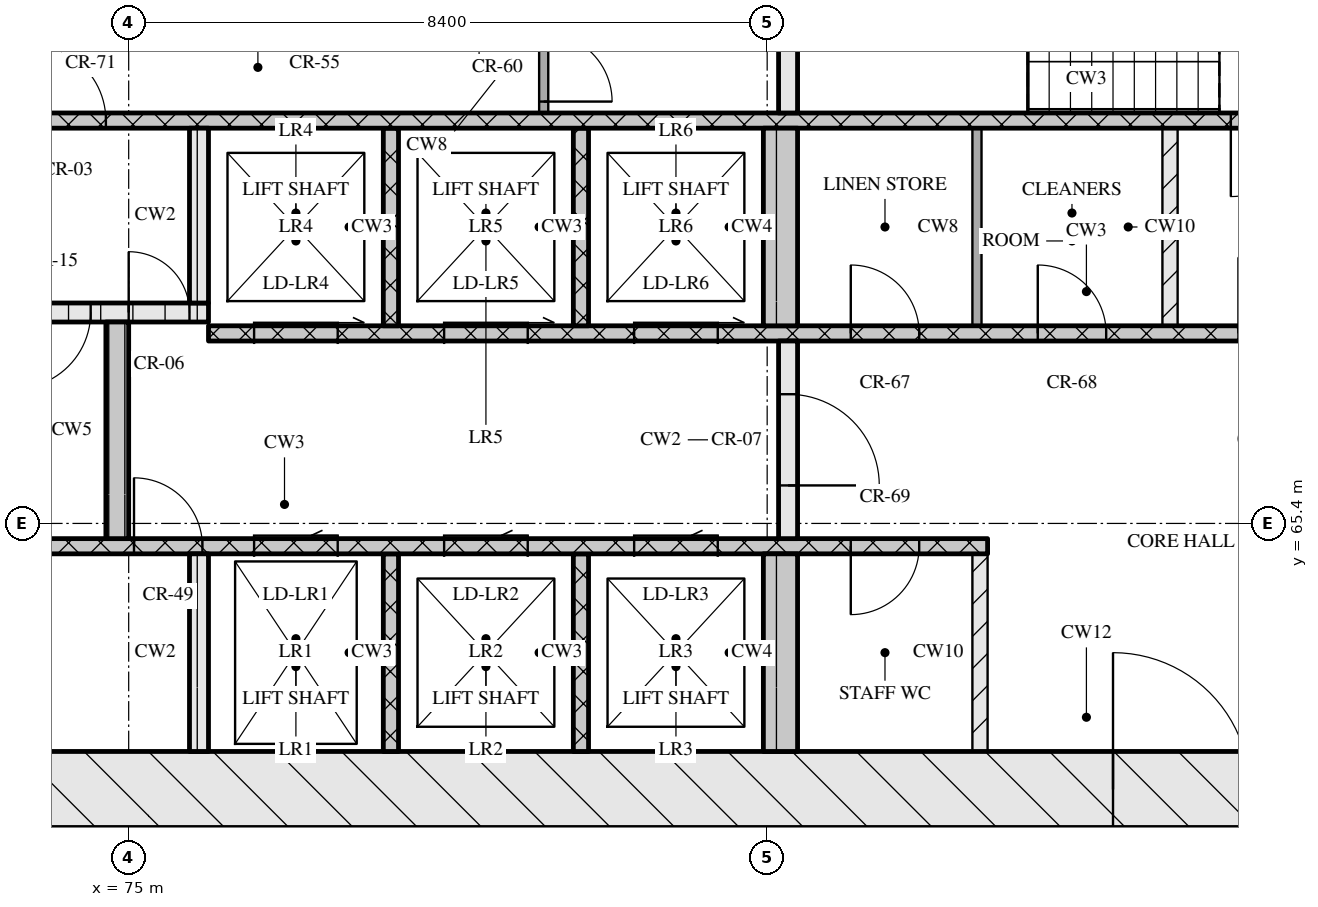
"""IFC4 building model, lengths in metres.
Left out: names, types, materials, properties, quantities, classifications, styles, units other than length and angle.
Written with IfcOpenShell. Run it as: python <this file> out.ifc"""

import sys

from ifc_helpers import new_model, si_unit, direction, frame, frame_2d, origin, place, context, subcontext, project, spatial, rectangle, extrude, element, fill, save


model = new_model("IFC4")
c1 = context("Model", 3, precision=1e-05, world=origin(), true_north=direction((0.0, 1.0)))
c2 = subcontext(c1, "Body", "Model", "MODEL_VIEW")
j1 = project(units=[si_unit("LENGTHUNIT", "METRE"), si_unit("PLANEANGLEUNIT", "RADIAN")], contexts=[c1])
p1 = place(None, origin())
s1 = spatial("IfcSite", under=j1, at=p1, CompositionType="ELEMENT")
p2 = place(p1, origin())
s2 = spatial("IfcBuilding", under=s1, at=p2, CompositionType="ELEMENT")
p3 = place(p2, frame((0.0, 0.0, 116.85)))
s3 = spatial("IfcBuildingStorey", under=s2, at=p3, CompositionType="ELEMENT", Elevation=116.85)
p4 = place(p3, frame((66.8, 61.9, 0.0), z_axis=(0.0, 0.0, 1.0), x_axis=(1.0, 0.0, 0.0)))
e1 = element("IfcWall", 1, at=p4, inside=s3, PredefinedType="SOLIDWALL", context=c2, shape_type="SweptSolid", body=[
    extrude(rectangle(XDim=41.6, YDim=1.0, at=frame_2d((20.8, 0.0))), origin(), (0.0, 0.0, 1.0), 3.32),
])
p5 = place(p4, frame((21.15, 0.0, 0.0)))
e2 = element("IfcOpeningElement", 2, at=p5, cuts=e1, PredefinedType="OPENING", context=c2, shape_type="SweptSolid", body=[
    extrude(rectangle(XDim=1.8, YDim=2.1, at=frame_2d((0.9, 1.05))), frame((0.0, 0.51, 0.0), z_axis=(0.0, -1.0, 0.0), x_axis=(1.0, 0.0, 0.0)), (0.0, 0.0, 1.0), 1.02),
])
p6 = place(p3, frame((75.925, 62.4, 0.0), z_axis=(0.0, 0.0, 1.0), x_axis=(0.0, 1.0, 0.0)))
e3 = element("IfcWall", 3, at=p6, inside=s3, PredefinedType="SOLIDWALL", context=c2, shape_type="SweptSolid", body=[
    extrude(rectangle(XDim=2.6, YDim=0.25, at=frame_2d((1.3, 0.0))), origin(), (0.0, 0.0, 1.0), 3.32),
])
for number, where, z_axis, x_axis in (
    (4, (78.45, 62.4, 0.0), (0.0, 0.0, 1.0), (0.0, 1.0, 0.0)),
    (5, (80.95, 62.4, 0.0), (0.0, 0.0, 1.0), (0.0, 1.0, 0.0)),
):
    element("IfcWall", number, at=place(p3, frame(where, z_axis=z_axis, x_axis=x_axis)), inside=s3, PredefinedType="SOLIDWALL", context=c2, shape_type="SweptSolid", body=[
        extrude(rectangle(XDim=2.6, YDim=0.2, at=frame_2d((1.3, 0.0))), origin(), (0.0, 0.0, 1.0), 3.32),
    ])
p7 = place(p3, frame((83.575, 62.4, 0.0), z_axis=(0.0, 0.0, 1.0), x_axis=(0.0, 1.0, 0.0)))
e6 = element("IfcWall", 6, at=p7, inside=s3, PredefinedType="SOLIDWALL", context=c2, shape_type="SweptSolid", body=[
    extrude(rectangle(XDim=2.6, YDim=0.45, at=frame_2d((1.3, 0.0))), origin(), (0.0, 0.0, 1.0), 3.32),
])
p8 = place(p3, frame((86.2, 62.4, 0.0), z_axis=(0.0, 0.0, 1.0), x_axis=(0.0, 1.0, 0.0)))
e7 = element("IfcWall", 7, at=p8, inside=s3, PredefinedType="PARTITIONING", context=c2, shape_type="SweptSolid", body=[
    extrude(rectangle(XDim=2.6, YDim=0.2, at=frame_2d((1.3, 0.0))), origin(), (0.0, 0.0, 1.0), 3.32),
])
p9 = place(p3, frame((67.8, 65.1, 0.0), z_axis=(0.0, 0.0, 1.0), x_axis=(1.0, 0.0, 0.0)))
e8 = element("IfcWall", 8, at=p9, inside=s3, PredefinedType="SOLIDWALL", context=c2, shape_type="SweptSolid", body=[
    extrude(rectangle(XDim=18.5, YDim=0.2, at=frame_2d((9.25, 0.0))), origin(), (0.0, 0.0, 1.0), 3.32),
])
p10 = place(p9, frame((7.27, 0.0, 0.0)))
e9 = element("IfcOpeningElement", 9, at=p10, cuts=e8, PredefinedType="OPENING", context=c2, shape_type="SweptSolid", body=[
    extrude(rectangle(XDim=0.9, YDim=2.1, at=frame_2d((0.45, 1.05))), frame((0.0, 0.11, 0.0), z_axis=(0.0, -1.0, 0.0), x_axis=(1.0, 0.0, 0.0)), (0.0, 0.0, 1.0), 0.22),
])
p11 = place(p9, frame((8.85, 0.0, 0.0)))
e10 = element("IfcOpeningElement", 10, at=p11, cuts=e8, PredefinedType="OPENING", context=c2, shape_type="SweptSolid", body=[
    extrude(rectangle(XDim=1.1, YDim=2.1, at=frame_2d((0.55, 1.05))), frame((0.0, 0.11, 0.0), z_axis=(0.0, -1.0, 0.0), x_axis=(1.0, 0.0, 0.0)), (0.0, 0.0, 1.0), 0.22),
])
p12 = place(p9, frame((11.35, 0.0, 0.0)))
e11 = element("IfcOpeningElement", 11, at=p12, cuts=e8, PredefinedType="OPENING", context=c2, shape_type="SweptSolid", body=[
    extrude(rectangle(XDim=1.1, YDim=2.1, at=frame_2d((0.55, 1.05))), frame((0.0, 0.11, 0.0), z_axis=(0.0, -1.0, 0.0), x_axis=(1.0, 0.0, 0.0)), (0.0, 0.0, 1.0), 0.22),
])
p13 = place(p9, frame((13.85, 0.0, 0.0)))
e12 = element("IfcOpeningElement", 12, at=p13, cuts=e8, PredefinedType="OPENING", context=c2, shape_type="SweptSolid", body=[
    extrude(rectangle(XDim=1.1, YDim=2.1, at=frame_2d((0.55, 1.05))), frame((0.0, 0.11, 0.0), z_axis=(0.0, -1.0, 0.0), x_axis=(1.0, 0.0, 0.0)), (0.0, 0.0, 1.0), 0.22),
])
p14 = place(p9, frame((16.7, 0.0, 0.0)))
e13 = element("IfcOpeningElement", 13, at=p14, cuts=e8, PredefinedType="OPENING", context=c2, shape_type="SweptSolid", body=[
    extrude(rectangle(XDim=0.9, YDim=2.1, at=frame_2d((0.45, 1.05))), frame((0.0, 0.11, 0.0), z_axis=(0.0, -1.0, 0.0), x_axis=(1.0, 0.0, 0.0)), (0.0, 0.0, 1.0), 0.22),
])
p15 = place(p3, frame((74.85, 65.2, 0.0), z_axis=(0.0, 0.0, 1.0), x_axis=(0.0, 1.0, 0.0)))
e14 = element("IfcWall", 14, at=p15, inside=s3, PredefinedType="SOLIDWALL", context=c2, shape_type="SweptSolid", body=[
    extrude(rectangle(XDim=2.85, YDim=0.3, at=frame_2d((1.425, 0.0))), origin(), (0.0, 0.0, 1.0), 3.32),
])
p16 = place(p3, frame((83.675, 65.2, 0.0), z_axis=(0.0, 0.0, 1.0), x_axis=(0.0, 1.0, 0.0)))
e15 = element("IfcWall", 15, at=p16, inside=s3, PredefinedType="SOLIDWALL", context=c2, shape_type="SweptSolid", body=[
    extrude(rectangle(XDim=2.6, YDim=0.25, at=frame_2d((1.3, 0.0))), origin(), (0.0, 0.0, 1.0), 3.32),
])
p17 = place(p16, frame((0.7, 0.0, 0.0)))
e16 = element("IfcOpeningElement", 16, at=p17, cuts=e15, PredefinedType="OPENING", context=c2, shape_type="SweptSolid", body=[
    extrude(rectangle(XDim=1.2, YDim=2.1, at=frame_2d((0.6, 1.05))), frame((0.0, 0.135, 0.0), z_axis=(0.0, -1.0, 0.0), x_axis=(1.0, 0.0, 0.0)), (0.0, 0.0, 1.0), 0.27),
])
p18 = place(p3, frame((76.05, 67.9, 0.0), z_axis=(0.0, 0.0, 1.0), x_axis=(1.0, 0.0, 0.0)))
e17 = element("IfcWall", 17, at=p18, inside=s3, PredefinedType="SOLIDWALL", context=c2, shape_type="SweptSolid", body=[
    extrude(rectangle(XDim=23.1, YDim=0.2, at=frame_2d((11.55, 0.0))), origin(), (0.0, 0.0, 1.0), 3.32),
])
p19 = place(p18, frame((0.6, 0.0, 0.0)))
e18 = element("IfcOpeningElement", 18, at=p19, cuts=e17, PredefinedType="OPENING", context=c2, shape_type="SweptSolid", body=[
    extrude(rectangle(XDim=1.1, YDim=2.1, at=frame_2d((0.55, 1.05))), frame((0.0, 0.11, 0.0), z_axis=(0.0, -1.0, 0.0), x_axis=(1.0, 0.0, 0.0)), (0.0, 0.0, 1.0), 0.22),
])
p20 = place(p18, frame((3.1, 0.0, 0.0)))
e19 = element("IfcOpeningElement", 19, at=p20, cuts=e17, PredefinedType="OPENING", context=c2, shape_type="SweptSolid", body=[
    extrude(rectangle(XDim=1.1, YDim=2.1, at=frame_2d((0.55, 1.05))), frame((0.0, 0.11, 0.0), z_axis=(0.0, -1.0, 0.0), x_axis=(1.0, 0.0, 0.0)), (0.0, 0.0, 1.0), 0.22),
])
p21 = place(p18, frame((5.6, 0.0, 0.0)))
e20 = element("IfcOpeningElement", 20, at=p21, cuts=e17, PredefinedType="OPENING", context=c2, shape_type="SweptSolid", body=[
    extrude(rectangle(XDim=1.1, YDim=2.1, at=frame_2d((0.55, 1.05))), frame((0.0, 0.11, 0.0), z_axis=(0.0, -1.0, 0.0), x_axis=(1.0, 0.0, 0.0)), (0.0, 0.0, 1.0), 0.22),
])
p22 = place(p18, frame((8.45, 0.0, 0.0)))
e21 = element("IfcOpeningElement", 21, at=p22, cuts=e17, PredefinedType="OPENING", context=c2, shape_type="SweptSolid", body=[
    extrude(rectangle(XDim=0.9, YDim=2.1, at=frame_2d((0.45, 1.05))), frame((0.0, 0.11, 0.0), z_axis=(0.0, -1.0, 0.0), x_axis=(1.0, 0.0, 0.0)), (0.0, 0.0, 1.0), 0.22),
])
p23 = place(p18, frame((10.91, 0.0, 0.0)))
e22 = element("IfcOpeningElement", 22, at=p23, cuts=e17, PredefinedType="OPENING", context=c2, shape_type="SweptSolid", body=[
    extrude(rectangle(XDim=0.9, YDim=2.1, at=frame_2d((0.45, 1.05))), frame((0.0, 0.11, 0.0), z_axis=(0.0, -1.0, 0.0), x_axis=(1.0, 0.0, 0.0)), (0.0, 0.0, 1.0), 0.22),
])
p24 = place(p18, frame((13.55, 0.0, 0.0)))
e23 = element("IfcOpeningElement", 23, at=p24, cuts=e17, PredefinedType="OPENING", context=c2, shape_type="SweptSolid", body=[
    extrude(rectangle(XDim=1.0, YDim=2.1, at=frame_2d((0.5, 1.05))), frame((0.0, 0.11, 0.0), z_axis=(0.0, -1.0, 0.0), x_axis=(1.0, 0.0, 0.0)), (0.0, 0.0, 1.0), 0.22),
])
for number, where, z_axis, x_axis in (
    (24, (78.45, 68.0, 0.0), (0.0, 0.0, 1.0), (0.0, 1.0, 0.0)),
    (25, (80.95, 68.0, 0.0), (0.0, 0.0, 1.0), (0.0, 1.0, 0.0)),
):
    element("IfcWall", number, at=place(p3, frame(where, z_axis=z_axis, x_axis=x_axis)), inside=s3, PredefinedType="SOLIDWALL", context=c2, shape_type="SweptSolid", body=[
        extrude(rectangle(XDim=2.6, YDim=0.2, at=frame_2d((1.3, 0.0))), origin(), (0.0, 0.0, 1.0), 3.32),
    ])
p25 = place(p3, frame((83.575, 68.0, 0.0), z_axis=(0.0, 0.0, 1.0), x_axis=(0.0, 1.0, 0.0)))
e26 = element("IfcWall", 26, at=p25, inside=s3, PredefinedType="SOLIDWALL", context=c2, shape_type="SweptSolid", body=[
    extrude(rectangle(XDim=2.6, YDim=0.45, at=frame_2d((1.3, 0.0))), origin(), (0.0, 0.0, 1.0), 3.32),
])
p26 = place(p3, frame((86.16, 68.0, 0.0), z_axis=(0.0, 0.0, 1.0), x_axis=(0.0, 1.0, 0.0)))
e27 = element("IfcWall", 27, at=p26, inside=s3, PredefinedType="PARTITIONING", context=c2, shape_type="SweptSolid", body=[
    extrude(rectangle(XDim=2.6, YDim=0.12, at=frame_2d((1.3, 0.0))), origin(), (0.0, 0.0, 1.0), 3.32),
])
p27 = place(p3, frame((88.7, 68.0, 0.0), z_axis=(0.0, 0.0, 1.0), x_axis=(0.0, 1.0, 0.0)))
e28 = element("IfcWall", 28, at=p27, inside=s3, PredefinedType="PARTITIONING", context=c2, shape_type="SweptSolid", body=[
    extrude(rectangle(XDim=2.6, YDim=0.2, at=frame_2d((1.3, 0.0))), origin(), (0.0, 0.0, 1.0), 3.32),
])
p28 = place(p3, frame((67.8, 68.175, 0.0), z_axis=(0.0, 0.0, 1.0), x_axis=(1.0, 0.0, 0.0)))
e29 = element("IfcWall", 29, at=p28, inside=s3, PredefinedType="SOLIDWALL", context=c2, shape_type="SweptSolid", body=[
    extrude(rectangle(XDim=8.25, YDim=0.25, at=frame_2d((4.125, 0.0))), origin(), (0.0, 0.0, 1.0), 3.32),
])
p29 = place(p28, frame((5.7, 0.0, 0.0)))
e30 = element("IfcOpeningElement", 30, at=p29, cuts=e29, PredefinedType="OPENING", context=c2, shape_type="SweptSolid", body=[
    extrude(rectangle(XDim=1.0, YDim=2.1, at=frame_2d((0.5, 1.05))), frame((0.0, 0.135, 0.0), z_axis=(0.0, -1.0, 0.0), x_axis=(1.0, 0.0, 0.0)), (0.0, 0.0, 1.0), 0.27),
])
p30 = place(p28, frame((7.2, 0.0, 0.0)))
e31 = element("IfcOpeningElement", 31, at=p30, cuts=e29, PredefinedType="OPENING", context=c2, shape_type="SweptSolid", body=[
    extrude(rectangle(XDim=0.8, YDim=2.1, at=frame_2d((0.4, 1.05))), frame((0.0, 0.135, 0.0), z_axis=(0.0, -1.0, 0.0), x_axis=(1.0, 0.0, 0.0)), (0.0, 0.0, 1.0), 0.27),
])
p31 = place(p3, frame((75.925, 68.3, 0.0), z_axis=(0.0, 0.0, 1.0), x_axis=(0.0, 1.0, 0.0)))
e32 = element("IfcWall", 32, at=p31, inside=s3, PredefinedType="SOLIDWALL", context=c2, shape_type="SweptSolid", body=[
    extrude(rectangle(XDim=2.3, YDim=0.25, at=frame_2d((1.15, 0.0))), origin(), (0.0, 0.0, 1.0), 3.32),
])
p32 = place(p3, frame((67.8, 70.7, 0.0), z_axis=(0.0, 0.0, 1.0), x_axis=(1.0, 0.0, 0.0)))
e33 = element("IfcWall", 33, at=p32, inside=s3, PredefinedType="SOLIDWALL", context=c2, shape_type="SweptSolid", body=[
    extrude(rectangle(XDim=39.6, YDim=0.2, at=frame_2d((19.8, 0.0))), origin(), (0.0, 0.0, 1.0), 3.32),
])
p33 = place(p32, frame((0.65, 0.0, 0.0)))
e34 = element("IfcOpeningElement", 34, at=p33, cuts=e33, PredefinedType="OPENING", context=c2, shape_type="SweptSolid", body=[
    extrude(rectangle(XDim=1.1, YDim=2.1, at=frame_2d((0.55, 1.05))), frame((0.0, 0.11, 0.0), z_axis=(0.0, -1.0, 0.0), x_axis=(1.0, 0.0, 0.0)), (0.0, 0.0, 1.0), 0.22),
])
p34 = place(p32, frame((3.25, 0.0, 0.0)))
e35 = element("IfcOpeningElement", 35, at=p34, cuts=e33, PredefinedType="OPENING", context=c2, shape_type="SweptSolid", body=[
    extrude(rectangle(XDim=1.1, YDim=2.1, at=frame_2d((0.55, 1.05))), frame((0.0, 0.11, 0.0), z_axis=(0.0, -1.0, 0.0), x_axis=(1.0, 0.0, 0.0)), (0.0, 0.0, 1.0), 0.22),
])
p35 = place(p32, frame((5.9, 0.0, 0.0)))
e36 = element("IfcOpeningElement", 36, at=p35, cuts=e33, PredefinedType="OPENING", context=c2, shape_type="SweptSolid", body=[
    extrude(rectangle(XDim=1.0, YDim=2.1, at=frame_2d((0.5, 1.05))), frame((0.0, 0.11, 0.0), z_axis=(0.0, -1.0, 0.0), x_axis=(1.0, 0.0, 0.0)), (0.0, 0.0, 1.0), 0.22),
])
p36 = place(p32, frame((21.7, 0.0, 0.0)))
e37 = element("IfcOpeningElement", 37, at=p36, cuts=e33, PredefinedType="OPENING", context=c2, shape_type="SweptSolid", body=[
    extrude(rectangle(XDim=1.0, YDim=2.1, at=frame_2d((0.5, 1.05))), frame((0.0, 0.11, 0.0), z_axis=(0.0, -1.0, 0.0), x_axis=(1.0, 0.0, 0.0)), (0.0, 0.0, 1.0), 0.22),
])
p37 = place(p32, frame((32.7, 0.0, 0.0)))
e38 = element("IfcOpeningElement", 38, at=p37, cuts=e33, PredefinedType="OPENING", context=c2, shape_type="SweptSolid", body=[
    extrude(rectangle(XDim=1.0, YDim=2.1, at=frame_2d((0.5, 1.05))), frame((0.0, 0.11, 0.0), z_axis=(0.0, -1.0, 0.0), x_axis=(1.0, 0.0, 0.0)), (0.0, 0.0, 1.0), 0.22),
])
p38 = place(p32, frame((35.25, 0.0, 0.0)))
e39 = element("IfcOpeningElement", 39, at=p38, cuts=e33, PredefinedType="OPENING", context=c2, shape_type="SweptSolid", body=[
    extrude(rectangle(XDim=1.1, YDim=2.1, at=frame_2d((0.55, 1.05))), frame((0.0, 0.11, 0.0), z_axis=(0.0, -1.0, 0.0), x_axis=(1.0, 0.0, 0.0)), (0.0, 0.0, 1.0), 0.22),
])
p39 = place(p32, frame((37.85, 0.0, 0.0)))
e40 = element("IfcOpeningElement", 40, at=p39, cuts=e33, PredefinedType="OPENING", context=c2, shape_type="SweptSolid", body=[
    extrude(rectangle(XDim=1.1, YDim=2.1, at=frame_2d((0.55, 1.05))), frame((0.0, 0.11, 0.0), z_axis=(0.0, -1.0, 0.0), x_axis=(1.0, 0.0, 0.0)), (0.0, 0.0, 1.0), 0.22),
])
p40 = place(p3, frame((80.46, 70.8, 0.0), z_axis=(0.0, 0.0, 1.0), x_axis=(0.0, 1.0, 0.0)))
e41 = element("IfcWall", 41, at=p40, inside=s3, PredefinedType="PARTITIONING", context=c2, shape_type="SweptSolid", body=[
    extrude(rectangle(XDim=1.2, YDim=0.12, at=frame_2d((0.6, 0.0))), origin(), (0.0, 0.0, 1.0), 3.32),
])
p41 = place(p40, frame((0.15, 0.0, 0.0)))
e42 = element("IfcOpeningElement", 42, at=p41, cuts=e41, PredefinedType="OPENING", context=c2, shape_type="SweptSolid", body=[
    extrude(rectangle(XDim=0.9, YDim=2.1, at=frame_2d((0.45, 1.05))), frame((0.0, 0.07, 0.0), z_axis=(0.0, -1.0, 0.0), x_axis=(1.0, 0.0, 0.0)), (0.0, 0.0, 1.0), 0.14),
])
p42 = place(p3, frame((83.675, 70.8, 0.0), z_axis=(0.0, 0.0, 1.0), x_axis=(0.0, 1.0, 0.0)))
e43 = element("IfcWall", 43, at=p42, inside=s3, PredefinedType="SOLIDWALL", context=c2, shape_type="SweptSolid", body=[
    extrude(rectangle(XDim=2.95, YDim=0.25, at=frame_2d((1.475, 0.0))), origin(), (0.0, 0.0, 1.0), 3.32),
])
p43 = place(p5, origin())
e44 = element("IfcDoor", 44, at=p43, inside=s3, OperationType="DOUBLE_DOOR_SINGLE_SWING", PredefinedType="DOOR", context=c2, shape_type="SweptSolid", body=[
    extrude(rectangle(XDim=1.8, YDim=2.1, at=frame_2d((0.9, 1.05))), frame((0.0, 0.025, 0.0), z_axis=(0.0, -1.0, 0.0), x_axis=(1.0, 0.0, 0.0)), (0.0, 0.0, 1.0), 0.05),
])
fill(e2, e44)
p44 = place(p10, origin())
e45 = element("IfcDoor", 45, at=p44, inside=s3, OperationType="SINGLE_SWING_LEFT", PredefinedType="DOOR", context=c2, shape_type="SweptSolid", body=[
    extrude(rectangle(XDim=0.9, YDim=2.1, at=frame_2d((0.45, 1.05))), frame((0.0, 0.025, 0.0), z_axis=(0.0, -1.0, 0.0), x_axis=(1.0, 0.0, 0.0)), (0.0, 0.0, 1.0), 0.05),
])
fill(e9, e45)
p45 = place(p11, origin())
e46 = element("IfcDoor", 46, at=p45, inside=s3, OperationType="SLIDING_TO_LEFT", PredefinedType="DOOR", context=c2, shape_type="SweptSolid", body=[
    extrude(rectangle(XDim=1.1, YDim=2.1, at=frame_2d((0.55, 1.05))), frame((0.0, 0.025, 0.0), z_axis=(0.0, -1.0, 0.0), x_axis=(1.0, 0.0, 0.0)), (0.0, 0.0, 1.0), 0.05),
])
fill(e10, e46)
p46 = place(p12, origin())
e47 = element("IfcDoor", 47, at=p46, inside=s3, OperationType="SLIDING_TO_LEFT", PredefinedType="DOOR", context=c2, shape_type="SweptSolid", body=[
    extrude(rectangle(XDim=1.1, YDim=2.1, at=frame_2d((0.55, 1.05))), frame((0.0, 0.025, 0.0), z_axis=(0.0, -1.0, 0.0), x_axis=(1.0, 0.0, 0.0)), (0.0, 0.0, 1.0), 0.05),
])
fill(e11, e47)
p47 = place(p13, origin())
e48 = element("IfcDoor", 48, at=p47, inside=s3, OperationType="SLIDING_TO_LEFT", PredefinedType="DOOR", context=c2, shape_type="SweptSolid", body=[
    extrude(rectangle(XDim=1.1, YDim=2.1, at=frame_2d((0.55, 1.05))), frame((0.0, 0.025, 0.0), z_axis=(0.0, -1.0, 0.0), x_axis=(1.0, 0.0, 0.0)), (0.0, 0.0, 1.0), 0.05),
])
fill(e12, e48)
p48 = place(p14, origin())
e49 = element("IfcDoor", 49, at=p48, inside=s3, OperationType="SINGLE_SWING_RIGHT", PredefinedType="DOOR", context=c2, shape_type="SweptSolid", body=[
    extrude(rectangle(XDim=0.9, YDim=2.1, at=frame_2d((0.45, 1.05))), frame((0.0, 0.025, 0.0), z_axis=(0.0, -1.0, 0.0), x_axis=(1.0, 0.0, 0.0)), (0.0, 0.0, 1.0), 0.05),
])
fill(e13, e49)
p49 = place(p17, origin())
e50 = element("IfcDoor", 50, at=p49, inside=s3, OperationType="SINGLE_SWING_RIGHT", PredefinedType="DOOR", context=c2, shape_type="SweptSolid", body=[
    extrude(rectangle(XDim=1.2, YDim=2.1, at=frame_2d((0.6, 1.05))), frame((0.0, 0.025, 0.0), z_axis=(0.0, -1.0, 0.0), x_axis=(1.0, 0.0, 0.0)), (0.0, 0.0, 1.0), 0.05),
])
fill(e16, e50)
p50 = place(p19, origin())
e51 = element("IfcDoor", 51, at=p50, inside=s3, OperationType="SLIDING_TO_RIGHT", PredefinedType="DOOR", context=c2, shape_type="SweptSolid", body=[
    extrude(rectangle(XDim=1.1, YDim=2.1, at=frame_2d((0.55, 1.05))), frame((0.0, 0.025, 0.0), z_axis=(0.0, -1.0, 0.0), x_axis=(1.0, 0.0, 0.0)), (0.0, 0.0, 1.0), 0.05),
])
fill(e18, e51)
p51 = place(p20, origin())
e52 = element("IfcDoor", 52, at=p51, inside=s3, OperationType="SLIDING_TO_RIGHT", PredefinedType="DOOR", context=c2, shape_type="SweptSolid", body=[
    extrude(rectangle(XDim=1.1, YDim=2.1, at=frame_2d((0.55, 1.05))), frame((0.0, 0.025, 0.0), z_axis=(0.0, -1.0, 0.0), x_axis=(1.0, 0.0, 0.0)), (0.0, 0.0, 1.0), 0.05),
])
fill(e19, e52)
p52 = place(p21, origin())
e53 = element("IfcDoor", 53, at=p52, inside=s3, OperationType="SLIDING_TO_RIGHT", PredefinedType="DOOR", context=c2, shape_type="SweptSolid", body=[
    extrude(rectangle(XDim=1.1, YDim=2.1, at=frame_2d((0.55, 1.05))), frame((0.0, 0.025, 0.0), z_axis=(0.0, -1.0, 0.0), x_axis=(1.0, 0.0, 0.0)), (0.0, 0.0, 1.0), 0.05),
])
fill(e20, e53)
p53 = place(p22, origin())
e54 = element("IfcDoor", 54, at=p53, inside=s3, OperationType="SINGLE_SWING_LEFT", PredefinedType="DOOR", context=c2, shape_type="SweptSolid", body=[
    extrude(rectangle(XDim=0.9, YDim=2.1, at=frame_2d((0.45, 1.05))), frame((0.0, 0.025, 0.0), z_axis=(0.0, -1.0, 0.0), x_axis=(1.0, 0.0, 0.0)), (0.0, 0.0, 1.0), 0.05),
])
fill(e21, e54)
p54 = place(p23, origin())
e55 = element("IfcDoor", 55, at=p54, inside=s3, OperationType="SINGLE_SWING_LEFT", PredefinedType="DOOR", context=c2, shape_type="SweptSolid", body=[
    extrude(rectangle(XDim=0.9, YDim=2.1, at=frame_2d((0.45, 1.05))), frame((0.0, 0.025, 0.0), z_axis=(0.0, -1.0, 0.0), x_axis=(1.0, 0.0, 0.0)), (0.0, 0.0, 1.0), 0.05),
])
fill(e22, e55)
p55 = place(p29, origin())
e56 = element("IfcDoor", 56, at=p55, inside=s3, OperationType="SINGLE_SWING_RIGHT", PredefinedType="DOOR", context=c2, shape_type="SweptSolid", body=[
    extrude(rectangle(XDim=1.0, YDim=2.1, at=frame_2d((0.5, 1.05))), frame((0.0, 0.025, 0.0), z_axis=(0.0, -1.0, 0.0), x_axis=(1.0, 0.0, 0.0)), (0.0, 0.0, 1.0), 0.05),
])
fill(e30, e56)
p56 = place(p30, origin())
e57 = element("IfcDoor", 57, at=p56, inside=s3, OperationType="SINGLE_SWING_LEFT", PredefinedType="DOOR", context=c2, shape_type="SweptSolid", body=[
    extrude(rectangle(XDim=0.8, YDim=2.1, at=frame_2d((0.4, 1.05))), frame((0.0, 0.025, 0.0), z_axis=(0.0, -1.0, 0.0), x_axis=(1.0, 0.0, 0.0)), (0.0, 0.0, 1.0), 0.05),
])
fill(e31, e57)
p57 = place(p35, origin())
e58 = element("IfcDoor", 58, at=p57, inside=s3, OperationType="SINGLE_SWING_LEFT", PredefinedType="DOOR", context=c2, shape_type="SweptSolid", body=[
    extrude(rectangle(XDim=1.0, YDim=2.1, at=frame_2d((0.5, 1.05))), frame((0.0, 0.025, 0.0), z_axis=(0.0, -1.0, 0.0), x_axis=(1.0, 0.0, 0.0)), (0.0, 0.0, 1.0), 0.05),
])
fill(e36, e58)
p58 = place(p36, origin())
e59 = element("IfcDoor", 59, at=p58, inside=s3, OperationType="SINGLE_SWING_RIGHT", PredefinedType="DOOR", context=c2, shape_type="SweptSolid", body=[
    extrude(rectangle(XDim=1.0, YDim=2.1, at=frame_2d((0.5, 1.05))), frame((0.0, 0.025, 0.0), z_axis=(0.0, -1.0, 0.0), x_axis=(1.0, 0.0, 0.0)), (0.0, 0.0, 1.0), 0.05),
])
fill(e37, e59)
p59 = place(p41, origin())
e60 = element("IfcDoor", 60, at=p59, inside=s3, OperationType="SINGLE_SWING_RIGHT", PredefinedType="DOOR", context=c2, shape_type="SweptSolid", body=[
    extrude(rectangle(XDim=0.9, YDim=2.1, at=frame_2d((0.45, 1.05))), frame((0.0, 0.025, 0.0), z_axis=(0.0, -1.0, 0.0), x_axis=(1.0, 0.0, 0.0)), (0.0, 0.0, 1.0), 0.05),
])
fill(e42, e60)
save(model, sys.argv[1])
